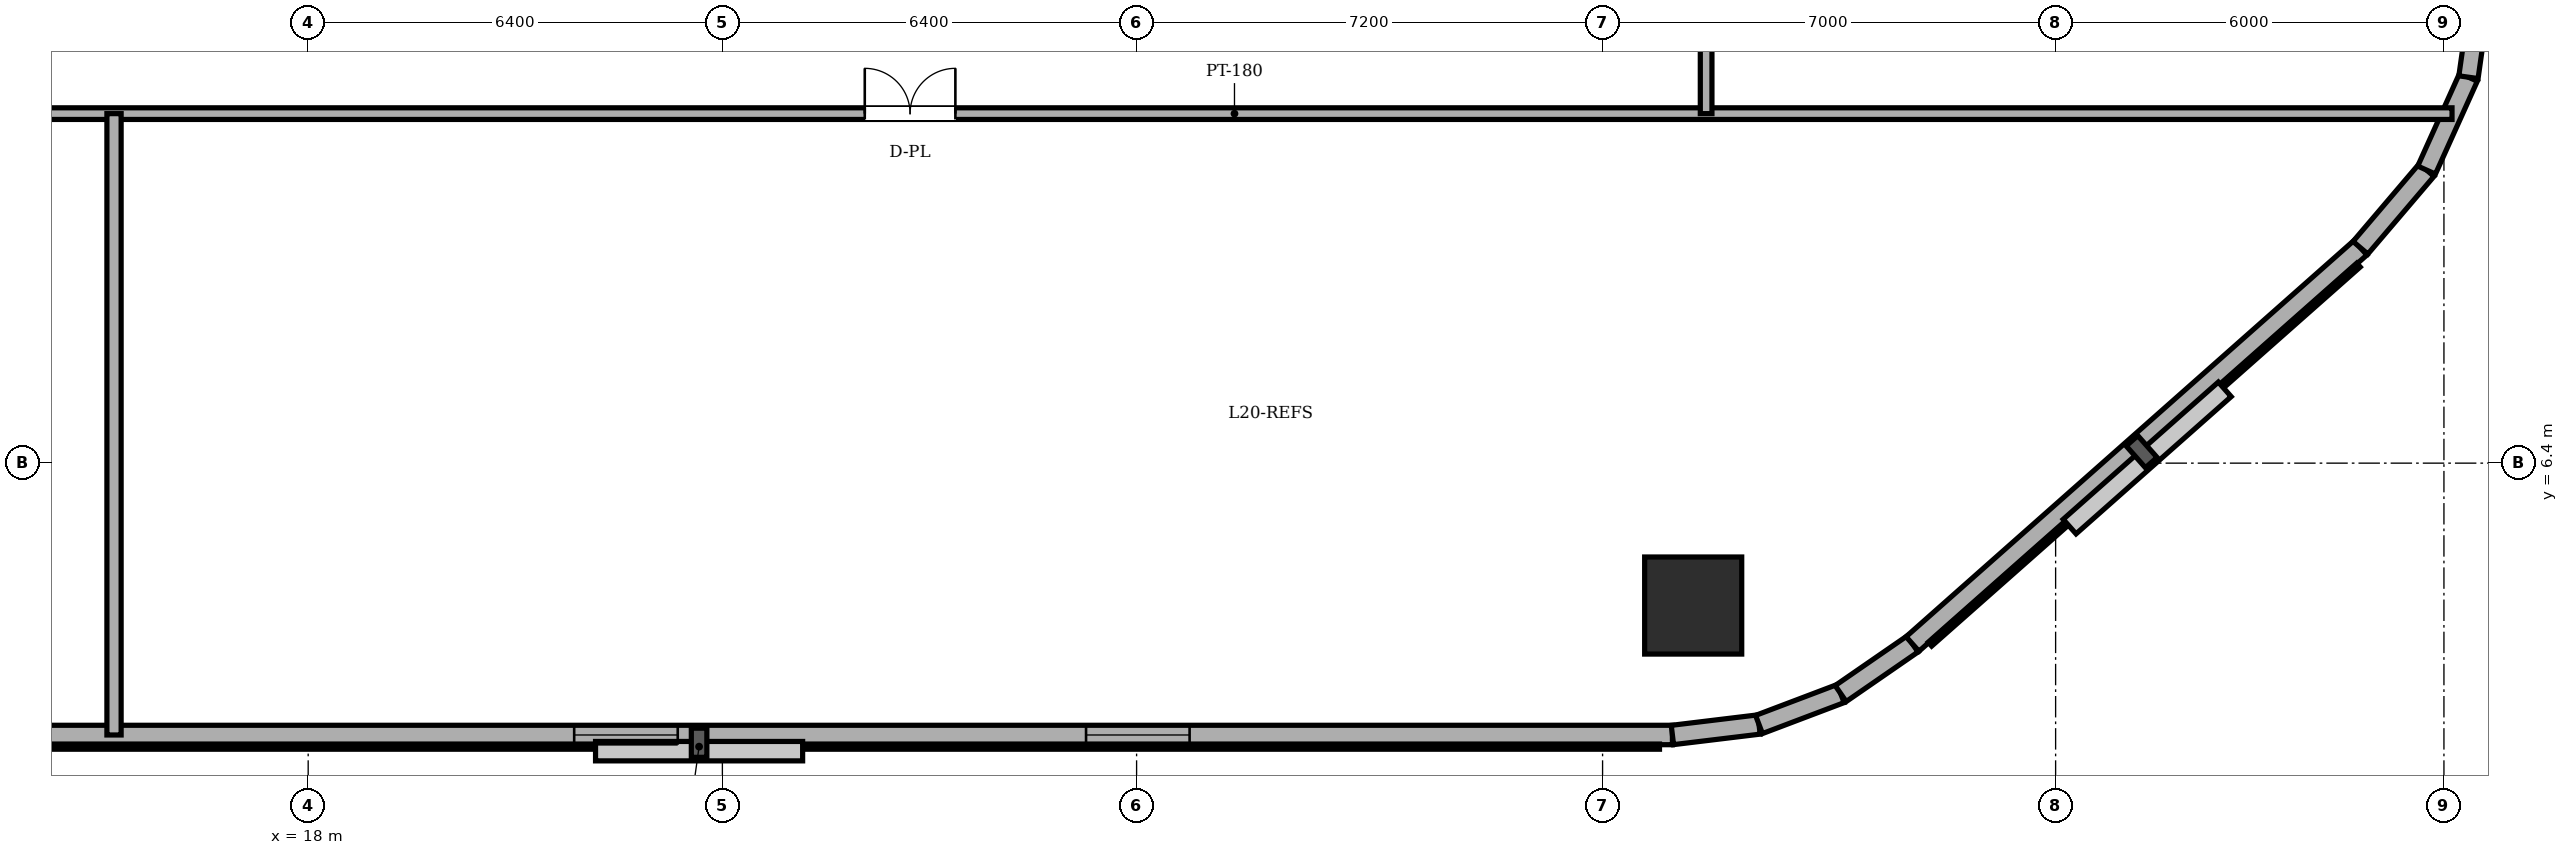
"""IFC4 building model, lengths in metres.
Left out: names, types, materials, properties, quantities, classifications, styles, units other than length and angle.
Written with IfcOpenShell. Run it as: python <this file> out.ifc"""

import sys

from ifc_helpers import new_model, si_unit, direction, frame, frame_2d, origin, origin_2d, place, context, subcontext, project, spatial, rectangle, circle, extrude, element, fill, save


model = new_model("IFC4")
c1 = context("Model", 3, precision=1e-05, world=origin(), true_north=direction((0.0, 1.0)))
c2 = subcontext(c1, "Body", "Model", "MODEL_VIEW")
j1 = project(units=[si_unit("LENGTHUNIT", "METRE"), si_unit("PLANEANGLEUNIT", "RADIAN")], contexts=[c1])
p1 = place(None, origin())
s1 = spatial("IfcSite", under=j1, at=p1, CompositionType="ELEMENT")
p2 = place(p1, origin())
s2 = spatial("IfcBuilding", under=s1, at=p2, CompositionType="ELEMENT")
p3 = place(p2, frame((0.0, 0.0, 75.6)))
s3 = spatial("IfcBuildingStorey", under=s2, at=p3, CompositionType="ELEMENT", Elevation=75.6)
p4 = place(p3, frame((39.4, 4.2, 0.0), z_axis=(0.0, 0.0, 1.0), x_axis=(1.0, 0.0, 0.0)))
e1 = element("IfcColumn", 1, at=p4, inside=s3, PredefinedType="COLUMN", context=c2, shape_type="SweptSolid", body=[
    extrude(circle(Radius=0.75, at=origin_2d()), origin(), (0.0, 0.0, 1.0), 2.96),
])
p5 = place(p3, frame((9.0, 2.2, 0.0), z_axis=(0.0, 0.0, 1.0), x_axis=(1.0, 0.0, 0.0)))
e2 = element("IfcWall", 2, at=p5, inside=s3, PredefinedType="SOLIDWALL", context=c2, shape_type="SweptSolid", body=[
    extrude(rectangle(XDim=30.079, YDim=0.3, at=frame_2d((15.04, 0.0))), origin(), (0.0, 0.0, 1.0), 5.36),
])
p6 = place(p5, frame((1.433, 0.0, 0.85)))
e3 = element("IfcOpeningElement", 3, at=p6, cuts=e2, PredefinedType="OPENING", context=c2, shape_type="SweptSolid", body=[
    extrude(rectangle(XDim=1.6, YDim=1.2, at=frame_2d((0.8, 0.6))), frame((0.0, 0.16, 0.0), z_axis=(0.0, -1.0, 0.0), x_axis=(1.0, 0.0, 0.0)), (0.0, 0.0, 1.0), 0.32),
])
p7 = place(p5, frame((3.317, 0.0, 0.85)))
e4 = element("IfcOpeningElement", 4, at=p7, cuts=e2, PredefinedType="OPENING", context=c2, shape_type="SweptSolid", body=[
    extrude(rectangle(XDim=1.6, YDim=1.2, at=frame_2d((0.8, 0.6))), frame((0.0, 0.16, 0.0), z_axis=(0.0, -1.0, 0.0), x_axis=(1.0, 0.0, 0.0)), (0.0, 0.0, 1.0), 0.32),
])
p8 = place(p5, frame((13.11, 0.0, 0.85)))
e5 = element("IfcOpeningElement", 5, at=p8, cuts=e2, PredefinedType="OPENING", context=c2, shape_type="SweptSolid", body=[
    extrude(rectangle(XDim=1.6, YDim=1.2, at=frame_2d((0.8, 0.6))), frame((0.0, 0.16, 0.0), z_axis=(0.0, -1.0, 0.0), x_axis=(1.0, 0.0, 0.0)), (0.0, 0.0, 1.0), 0.32),
])
p9 = place(p5, frame((21.019, 0.0, 0.85)))
e6 = element("IfcOpeningElement", 6, at=p9, cuts=e2, PredefinedType="OPENING", context=c2, shape_type="SweptSolid", body=[
    extrude(rectangle(XDim=1.6, YDim=1.2, at=frame_2d((0.8, 0.6))), frame((0.0, 0.16, 0.0), z_axis=(0.0, -1.0, 0.0), x_axis=(1.0, 0.0, 0.0)), (0.0, 0.0, 1.0), 0.32),
])
p10 = place(p3, frame((39.079, 2.2, 0.0), z_axis=(0.0, 0.0, 1.0), x_axis=(0.992739027259, 0.120288086515, 0.0)))
e7 = element("IfcWall", 7, at=p10, inside=s3, PredefinedType="SOLIDWALL", context=c2, shape_type="SweptSolid", body=[
    extrude(rectangle(XDim=1.348, YDim=0.3, at=frame_2d((0.674, 0.0))), origin(), (0.0, 0.0, 1.0), 5.36),
])
p11 = place(p3, frame((40.417, 2.362, 0.0), z_axis=(0.0, 0.0, 1.0), x_axis=(0.935156721165, 0.354234254216, 0.0)))
e8 = element("IfcWall", 8, at=p11, inside=s3, PredefinedType="SOLIDWALL", context=c2, shape_type="SweptSolid", body=[
    extrude(rectangle(XDim=1.349, YDim=0.3, at=frame_2d((0.675, 0.0))), origin(), (0.0, 0.0, 1.0), 5.36),
])
p12 = place(p3, frame((41.679, 2.84, 0.0), z_axis=(0.0, 0.0, 1.0), x_axis=(0.823116500192, 0.567872544777, 0.0)))
e9 = element("IfcWall", 9, at=p12, inside=s3, PredefinedType="SOLIDWALL", context=c2, shape_type="SweptSolid", body=[
    extrude(rectangle(XDim=1.349, YDim=0.3, at=frame_2d((0.674, 0.0))), origin(), (0.0, 0.0, 1.0), 5.36),
])
p13 = place(p3, frame((42.789, 3.606, 0.0), z_axis=(0.0, 0.0, 1.0), x_axis=(0.749010683286, 0.662557919221, 0.0)))
e10 = element("IfcWall", 10, at=p13, inside=s3, PredefinedType="SOLIDWALL", context=c2, shape_type="SweptSolid", body=[
    extrude(rectangle(XDim=9.24, YDim=0.3, at=frame_2d((4.62, 0.0))), origin(), (0.0, 0.0, 1.0), 5.36),
])
p14 = place(p3, frame((49.71, 9.728, 0.0), z_axis=(0.0, 0.0, 1.0), x_axis=(0.648389989909, 0.7613083613, 0.0)))
e11 = element("IfcWall", 11, at=p14, inside=s3, PredefinedType="SOLIDWALL", context=c2, shape_type="SweptSolid", body=[
    extrude(rectangle(XDim=1.576, YDim=0.3, at=frame_2d((0.788, 0.0))), origin(), (0.0, 0.0, 1.0), 5.36),
])
p15 = place(p3, frame((50.732, 10.928, 0.0), z_axis=(0.0, 0.0, 1.0), x_axis=(0.410996558744, 0.911636895206, 0.0)))
e12 = element("IfcWall", 12, at=p15, inside=s3, PredefinedType="SOLIDWALL", context=c2, shape_type="SweptSolid", body=[
    extrude(rectangle(XDim=1.574, YDim=0.3, at=frame_2d((0.787, 0.0))), origin(), (0.0, 0.0, 1.0), 5.36),
])
p16 = place(p3, frame((51.379, 12.363, 0.0), z_axis=(0.0, 0.0, 1.0), x_axis=(0.140380048512, 0.990097693149, 0.0)))
e13 = element("IfcWall", 13, at=p16, inside=s3, PredefinedType="SOLIDWALL", context=c2, shape_type="SweptSolid", body=[
    extrude(rectangle(XDim=1.576, YDim=0.3, at=frame_2d((0.788, 0.0))), origin(), (0.0, 0.0, 1.0), 5.36),
])
p17 = place(p3, frame((13.5, 11.8, 0.0), z_axis=(0.0, 0.0, 1.0), x_axis=(1.0, 0.0, 0.0)))
e14 = element("IfcWall", 14, at=p17, inside=s3, PredefinedType="PARTITIONING", context=c2, shape_type="SweptSolid", body=[
    extrude(rectangle(XDim=37.625, YDim=0.18, at=frame_2d((18.812, 0.0))), origin(), (0.0, 0.0, 1.0), 5.36),
])
p18 = place(p17, frame((13.1, 0.0, 0.0)))
e15 = element("IfcOpeningElement", 15, at=p18, cuts=e14, PredefinedType="OPENING", context=c2, shape_type="SweptSolid", body=[
    extrude(rectangle(XDim=1.4, YDim=2.25, at=frame_2d((0.7, 1.125))), frame((0.0, 0.1, 0.0), z_axis=(0.0, -1.0, 0.0), x_axis=(1.0, 0.0, 0.0)), (0.0, 0.0, 1.0), 0.2),
])
p19 = place(p3, frame((15.0, 2.2, 0.0), z_axis=(0.0, 0.0, 1.0), x_axis=(0.0, 1.0, 0.0)))
e16 = element("IfcWall", 16, at=p19, inside=s3, PredefinedType="PARTITIONING", context=c2, shape_type="SweptSolid", body=[
    extrude(rectangle(XDim=9.6, YDim=0.22, at=frame_2d((4.8, 0.0))), origin(), (0.0, 0.0, 1.0), 5.36),
])
p20 = place(p3, frame((39.6, 11.8, 0.0), z_axis=(0.0, 0.0, 1.0), x_axis=(0.0, 1.0, 0.0)))
e17 = element("IfcWall", 17, at=p20, inside=s3, PredefinedType="PARTITIONING", context=c2, shape_type="SweptSolid", body=[
    extrude(rectangle(XDim=24.4, YDim=0.18, at=frame_2d((12.2, 0.0))), origin(), (0.0, 0.0, 1.0), 5.36),
])
p21 = place(p20, frame((18.07, 0.0, 0.0)))
e18 = element("IfcOpeningElement", 18, at=p21, cuts=e17, PredefinedType="OPENING", context=c2, shape_type="SweptSolid", body=[
    extrude(rectangle(XDim=1.4, YDim=2.25, at=frame_2d((0.7, 1.125))), frame((0.0, 0.1, 0.0), z_axis=(0.0, -1.0, 0.0), x_axis=(1.0, 0.0, 0.0)), (0.0, 0.0, 1.0), 0.2),
])
p22 = place(p20, frame((5.225, 0.0, 0.0)))
e19 = element("IfcOpeningElement", 19, at=p22, cuts=e17, PredefinedType="OPENING", context=c2, shape_type="SweptSolid", body=[
    extrude(rectangle(XDim=1.4, YDim=2.25, at=frame_2d((0.7, 1.125))), frame((0.0, 0.1, 0.0), z_axis=(0.0, -1.0, 0.0), x_axis=(1.0, 0.0, 0.0)), (0.0, 0.0, 1.0), 0.2),
])
p23 = place(p20, frame((10.2, 0.0, 0.0)))
e20 = element("IfcOpeningElement", 20, at=p23, cuts=e17, PredefinedType="OPENING", context=c2, shape_type="SweptSolid", body=[
    extrude(rectangle(XDim=1.4, YDim=2.25, at=frame_2d((0.7, 1.125))), frame((0.0, 0.1, 0.0), z_axis=(0.0, -1.0, 0.0), x_axis=(1.0, 0.0, 0.0)), (0.0, 0.0, 1.0), 0.2),
])
p24 = place(p8, origin())
e21 = element("IfcWindow", 21, at=p24, inside=s3, PartitioningType="DOUBLE_PANEL_VERTICAL", PredefinedType="WINDOW", context=c2, shape_type="SweptSolid", body=[
    extrude(rectangle(XDim=1.6, YDim=1.2, at=frame_2d((0.8, 0.6))), frame((0.0, 0.03, 0.0), z_axis=(0.0, -1.0, 0.0), x_axis=(1.0, 0.0, 0.0)), (0.0, 0.0, 1.0), 0.06),
])
fill(e5, e21)
p25 = place(p9, origin())
e22 = element("IfcWindow", 22, at=p25, inside=s3, PartitioningType="DOUBLE_PANEL_VERTICAL", PredefinedType="WINDOW", context=c2, shape_type="SweptSolid", body=[
    extrude(rectangle(XDim=1.6, YDim=1.2, at=frame_2d((0.8, 0.6))), frame((0.0, 0.03, 0.0), z_axis=(0.0, -1.0, 0.0), x_axis=(1.0, 0.0, 0.0)), (0.0, 0.0, 1.0), 0.06),
])
fill(e6, e22)
p26 = place(p18, origin())
e23 = element("IfcDoor", 23, at=p26, inside=s3, OperationType="DOUBLE_DOOR_SINGLE_SWING", PredefinedType="DOOR", context=c2, shape_type="SweptSolid", body=[
    extrude(rectangle(XDim=1.4, YDim=2.25, at=frame_2d((0.7, 1.125))), frame((0.0, 0.025, 0.0), z_axis=(0.0, -1.0, 0.0), x_axis=(1.0, 0.0, 0.0)), (0.0, 0.0, 1.0), 0.05),
])
fill(e15, e23)
save(model, sys.argv[1])
